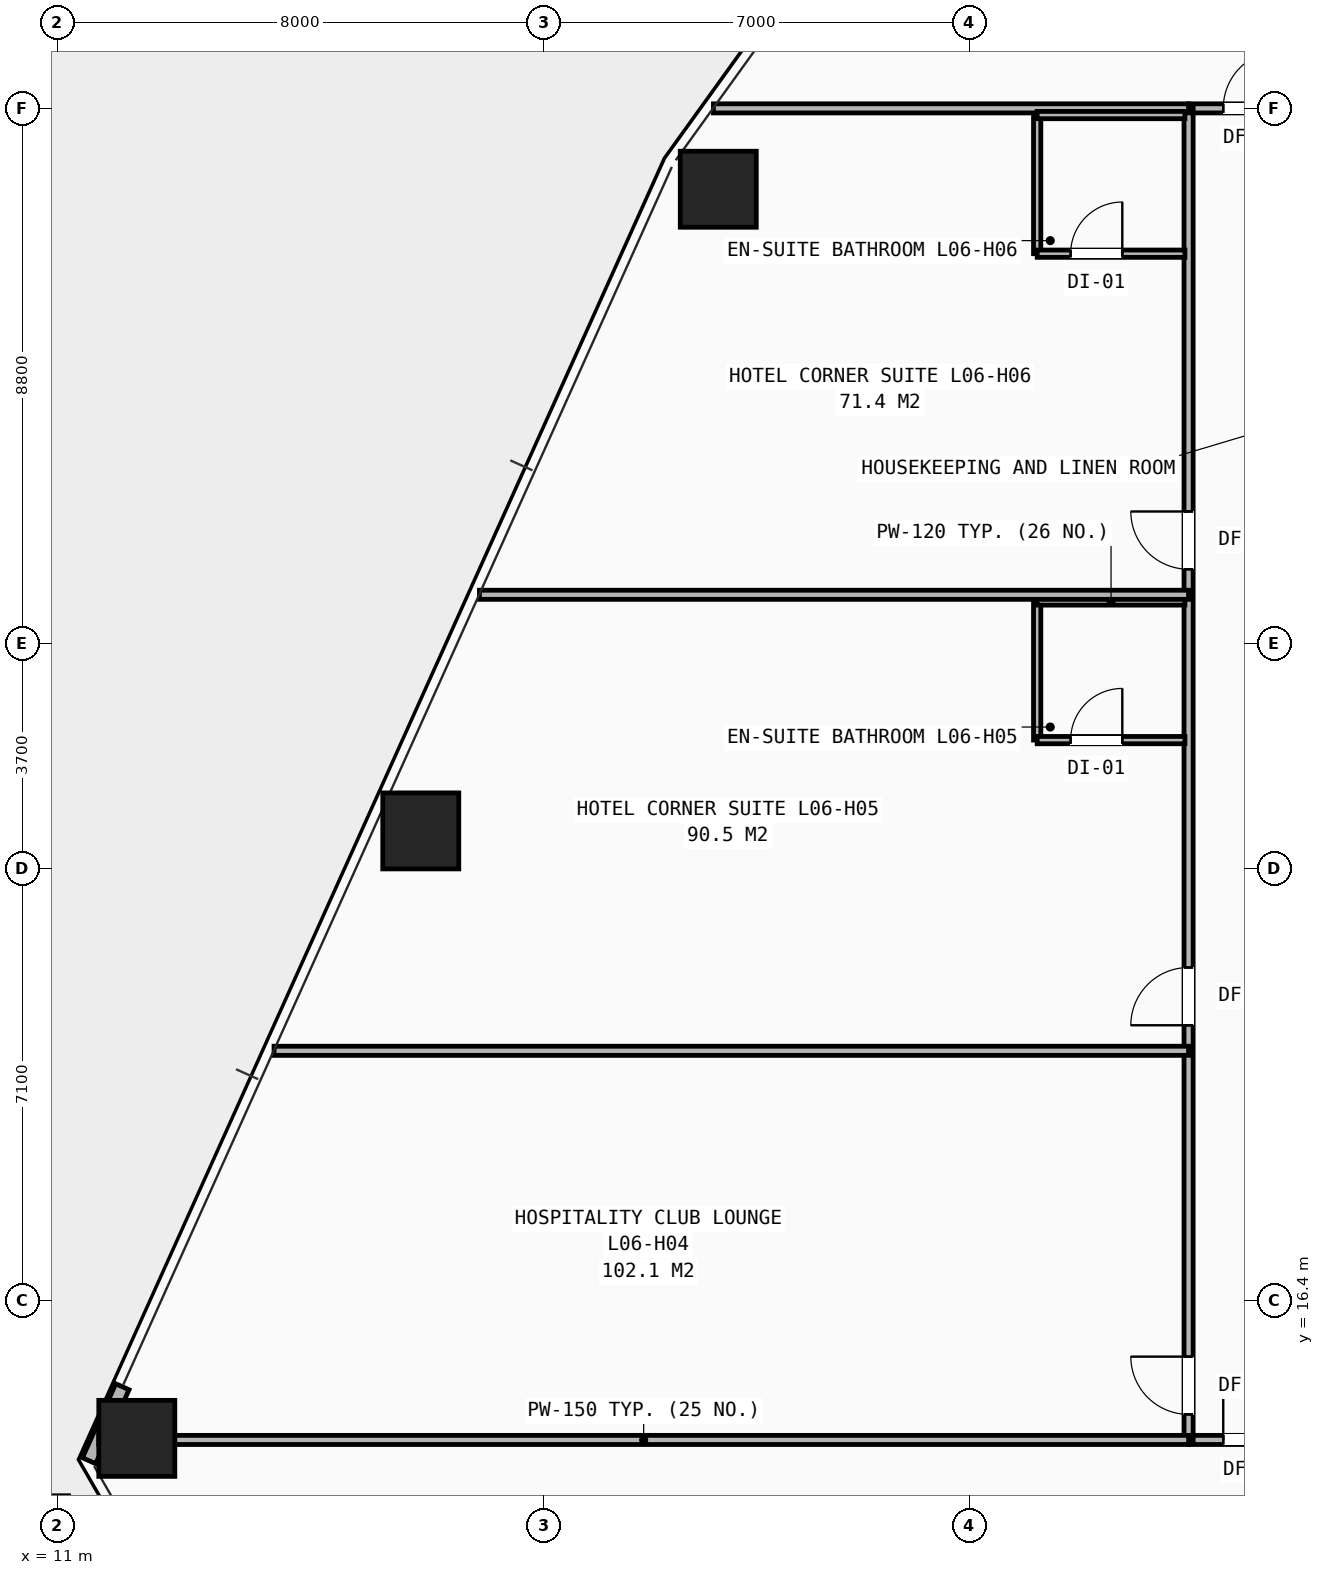
"""IFC4 building model, lengths in metres.
Left out: names, types, materials, properties, quantities, classifications, styles, units other than length and angle.
Written with IfcOpenShell. Run it as: python <this file> out.ifc"""

import sys

from ifc_helpers import new_model, si_unit, direction, frame, frame_2d, origin, origin_2d, place, context, subcontext, project, spatial, rectangle, hollow_rectangle, extrude, element, fill, save


model = new_model("IFC4")
c1 = context("Model", 3, precision=1e-05, world=origin(), true_north=direction((0.0, 1.0)))
c2 = subcontext(c1, "Body", "Model", "MODEL_VIEW")
j1 = project(units=[si_unit("LENGTHUNIT", "METRE"), si_unit("PLANEANGLEUNIT", "RADIAN")], contexts=[c1])
p1 = place(None, origin())
s1 = spatial("IfcSite", under=j1, at=p1, CompositionType="ELEMENT")
p2 = place(p1, origin())
s2 = spatial("IfcBuilding", under=s1, at=p2, CompositionType="ELEMENT")
p3 = place(p2, frame((0.0, 0.0, 27.2)))
s3 = spatial("IfcBuildingStorey", under=s2, at=p3, CompositionType="ELEMENT", Elevation=27.2)
for number, where, z_axis, x_axis in (
    (1, (21.865, 34.67, 0.0), (0.0, 0.0, 1.0), (1.0, 0.0, 0.0)),
    (2, (16.973, 24.116, 0.0), (0.0, 0.0, 1.0), (1.0, 0.0, 0.0)),
    (3, (12.303, 14.126, 0.0), (0.0, 0.0, 1.0), (1.0, 0.0, 0.0)),
):
    element("IfcColumn", number, at=place(p3, frame(where, z_axis=z_axis, x_axis=x_axis)), inside=s3, PredefinedType="COLUMN", context=c2, shape_type="SweptSolid", body=[
        extrude(hollow_rectangle(XDim=1.25, YDim=1.25, WallThickness=0.08, at=origin_2d()), origin(), (0.0, 0.0, 1.0), 3.2),
    ])
p4 = place(p3, frame((12.065, 14.975, 0.0), z_axis=(0.0, 0.0, 1.0), x_axis=(-0.410767856127, -0.91173996752, 0.0)))
e4 = element("IfcWall", 4, at=p4, inside=s3, PredefinedType="SHEAR", context=c2, shape_type="SweptSolid", body=[
    extrude(rectangle(XDim=1.334, YDim=0.24, at=frame_2d((0.667, 0.0))), origin(), (0.0, 0.0, 1.0), 2.263),
])
p5 = place(p3, frame((29.6, 14.1, 0.0), z_axis=(0.0, 0.0, 1.0), x_axis=(1.0, 0.0, 0.0)))
e5 = element("IfcWall", 5, at=p5, inside=s3, PredefinedType="PARTITIONING", context=c2, shape_type="SweptSolid", body=[
    extrude(rectangle(XDim=20.8, YDim=0.15, at=frame_2d((10.4, 0.0))), origin(), (0.0, 0.0, 1.0), 2.431),
])
p6 = place(p5, frame((0.57, 0.0, 0.0)))
e6 = element("IfcOpeningElement", 6, at=p6, cuts=e5, PredefinedType="OPENING", context=c2, shape_type="SweptSolid", body=[
    extrude(rectangle(XDim=0.95, YDim=2.1, at=frame_2d((0.475, 1.05))), frame((0.0, 0.085, 0.0), z_axis=(0.0, -1.0, 0.0), x_axis=(1.0, 0.0, 0.0)), (0.0, 0.0, 1.0), 0.17),
])
p7 = place(p5, frame((5.32, 0.0, 0.0)))
e7 = element("IfcOpeningElement", 7, at=p7, cuts=e5, PredefinedType="OPENING", context=c2, shape_type="SweptSolid", body=[
    extrude(rectangle(XDim=0.95, YDim=2.1, at=frame_2d((0.475, 1.05))), frame((0.0, 0.085, 0.0), z_axis=(0.0, -1.0, 0.0), x_axis=(1.0, 0.0, 0.0)), (0.0, 0.0, 1.0), 0.17),
])
p8 = place(p5, frame((13.32, 0.0, 0.0)))
e8 = element("IfcOpeningElement", 8, at=p8, cuts=e5, PredefinedType="OPENING", context=c2, shape_type="SweptSolid", body=[
    extrude(rectangle(XDim=0.95, YDim=2.1, at=frame_2d((0.475, 1.05))), frame((0.0, 0.085, 0.0), z_axis=(0.0, -1.0, 0.0), x_axis=(1.0, 0.0, 0.0)), (0.0, 0.0, 1.0), 0.17),
])
p9 = place(p3, frame((29.6, 36.0, 0.0), z_axis=(0.0, 0.0, 1.0), x_axis=(1.0, 0.0, 0.0)))
e9 = element("IfcWall", 9, at=p9, inside=s3, PredefinedType="PARTITIONING", context=c2, shape_type="SweptSolid", body=[
    extrude(rectangle(XDim=10.375, YDim=0.15, at=frame_2d((5.188, 0.0))), origin(), (0.0, 0.0, 1.0), 2.98),
])
p10 = place(p9, frame((0.57, 0.0, 0.0)))
e10 = element("IfcOpeningElement", 10, at=p10, cuts=e9, PredefinedType="OPENING", context=c2, shape_type="SweptSolid", body=[
    extrude(rectangle(XDim=0.95, YDim=2.1, at=frame_2d((0.475, 1.05))), frame((0.0, 0.085, 0.0), z_axis=(0.0, -1.0, 0.0), x_axis=(1.0, 0.0, 0.0)), (0.0, 0.0, 1.0), 0.17),
])
p11 = place(p9, frame((5.32, 0.0, 0.0)))
e11 = element("IfcOpeningElement", 11, at=p11, cuts=e9, PredefinedType="OPENING", context=c2, shape_type="SweptSolid", body=[
    extrude(rectangle(XDim=0.95, YDim=2.1, at=frame_2d((0.475, 1.05))), frame((0.0, 0.085, 0.0), z_axis=(0.0, -1.0, 0.0), x_axis=(1.0, 0.0, 0.0)), (0.0, 0.0, 1.0), 0.17),
])
p12 = place(p3, frame((29.6, 14.1, 0.0), z_axis=(0.0, 0.0, 1.0), x_axis=(0.0, 1.0, 0.0)))
e12 = element("IfcWall", 12, at=p12, inside=s3, PredefinedType="PARTITIONING", context=c2, shape_type="SweptSolid", body=[
    extrude(rectangle(XDim=21.9, YDim=0.15, at=frame_2d((10.95, 0.0))), origin(), (0.0, 0.0, 1.0), 2.431),
])
p13 = place(p12, frame((0.42, 0.0, 0.0)))
e13 = element("IfcOpeningElement", 13, at=p13, cuts=e12, PredefinedType="OPENING", context=c2, shape_type="SweptSolid", body=[
    extrude(rectangle(XDim=0.95, YDim=2.1, at=frame_2d((0.475, 1.05))), frame((0.0, 0.085, 0.0), z_axis=(0.0, -1.0, 0.0), x_axis=(1.0, 0.0, 0.0)), (0.0, 0.0, 1.0), 0.17),
])
p14 = place(p12, frame((6.82, 0.0, 0.0)))
e14 = element("IfcOpeningElement", 14, at=p14, cuts=e12, PredefinedType="OPENING", context=c2, shape_type="SweptSolid", body=[
    extrude(rectangle(XDim=0.95, YDim=2.1, at=frame_2d((0.475, 1.05))), frame((0.0, 0.085, 0.0), z_axis=(0.0, -1.0, 0.0), x_axis=(1.0, 0.0, 0.0)), (0.0, 0.0, 1.0), 0.17),
])
p15 = place(p12, frame((14.32, 0.0, 0.0)))
e15 = element("IfcOpeningElement", 15, at=p15, cuts=e12, PredefinedType="OPENING", context=c2, shape_type="SweptSolid", body=[
    extrude(rectangle(XDim=0.95, YDim=2.1, at=frame_2d((0.475, 1.05))), frame((0.0, 0.085, 0.0), z_axis=(0.0, -1.0, 0.0), x_axis=(1.0, 0.0, 0.0)), (0.0, 0.0, 1.0), 0.17),
])
p16 = place(p3, frame((11.677, 14.1, 0.0), z_axis=(0.0, 0.0, 1.0), x_axis=(1.0, 0.0, 0.0)))
e16 = element("IfcWall", 16, at=p16, inside=s3, PredefinedType="PARTITIONING", context=c2, shape_type="SweptSolid", body=[
    extrude(rectangle(XDim=17.923, YDim=0.15, at=frame_2d((8.961, 0.0))), origin(), (0.0, 0.0, 1.0), 2.268),
])
p17 = place(p3, frame((21.786, 36.0, 0.0), z_axis=(0.0, 0.0, 1.0), x_axis=(1.0, 0.0, 0.0)))
e17 = element("IfcWall", 17, at=p17, inside=s3, PredefinedType="PARTITIONING", context=c2, shape_type="SweptSolid", body=[
    extrude(rectangle(XDim=7.814, YDim=0.15, at=frame_2d((3.907, 0.0))), origin(), (0.0, 0.0, 1.0), 2.268),
])
p18 = place(p3, frame((14.56, 20.5, 0.0), z_axis=(0.0, 0.0, 1.0), x_axis=(1.0, 0.0, 0.0)))
e18 = element("IfcWall", 18, at=p18, inside=s3, PredefinedType="PARTITIONING", context=c2, shape_type="SweptSolid", body=[
    extrude(rectangle(XDim=15.041, YDim=0.15, at=frame_2d((7.52, 0.0))), origin(), (0.0, 0.0, 1.0), 2.268),
])
p19 = place(p3, frame((27.11, 25.61, 0.0), z_axis=(0.0, 0.0, 1.0), x_axis=(0.0, 1.0, 0.0)))
e19 = element("IfcWall", 19, at=p19, inside=s3, PredefinedType="PARTITIONING", context=c2, shape_type="SweptSolid", body=[
    extrude(rectangle(XDim=2.28, YDim=0.12, at=frame_2d((1.14, 0.0))), origin(), (0.0, 0.0, 1.0), 2.98),
])
p20 = place(p3, frame((27.11, 25.61, 0.0), z_axis=(0.0, 0.0, 1.0), x_axis=(1.0, 0.0, 0.0)))
e20 = element("IfcWall", 20, at=p20, inside=s3, PredefinedType="PARTITIONING", context=c2, shape_type="SweptSolid", body=[
    extrude(rectangle(XDim=2.43, YDim=0.12, at=frame_2d((1.215, 0.0))), origin(), (0.0, 0.0, 1.0), 2.98),
])
p21 = place(p20, frame((0.55, 0.0, 0.0)))
e21 = element("IfcOpeningElement", 21, at=p21, cuts=e20, PredefinedType="OPENING", context=c2, shape_type="SweptSolid", body=[
    extrude(rectangle(XDim=0.85, YDim=2.05, at=frame_2d((0.425, 1.025))), frame((0.0, 0.07, 0.0), z_axis=(0.0, -1.0, 0.0), x_axis=(1.0, 0.0, 0.0)), (0.0, 0.0, 1.0), 0.14),
])
p22 = place(p3, frame((27.11, 27.89, 0.0), z_axis=(0.0, 0.0, 1.0), x_axis=(1.0, 0.0, 0.0)))
e22 = element("IfcWall", 22, at=p22, inside=s3, PredefinedType="PARTITIONING", context=c2, shape_type="SweptSolid", body=[
    extrude(rectangle(XDim=2.43, YDim=0.12, at=frame_2d((1.215, 0.0))), origin(), (0.0, 0.0, 1.0), 2.98),
])
p23 = place(p3, frame((17.938, 28.0, 0.0), z_axis=(0.0, 0.0, 1.0), x_axis=(1.0, 0.0, 0.0)))
e23 = element("IfcWall", 23, at=p23, inside=s3, PredefinedType="PARTITIONING", context=c2, shape_type="SweptSolid", body=[
    extrude(rectangle(XDim=11.662, YDim=0.15, at=frame_2d((5.831, 0.0))), origin(), (0.0, 0.0, 1.0), 2.268),
])
p24 = place(p3, frame((27.11, 33.61, 0.0), z_axis=(0.0, 0.0, 1.0), x_axis=(0.0, 1.0, 0.0)))
e24 = element("IfcWall", 24, at=p24, inside=s3, PredefinedType="PARTITIONING", context=c2, shape_type="SweptSolid", body=[
    extrude(rectangle(XDim=2.28, YDim=0.12, at=frame_2d((1.14, 0.0))), origin(), (0.0, 0.0, 1.0), 2.513),
])
p25 = place(p3, frame((27.11, 33.61, 0.0), z_axis=(0.0, 0.0, 1.0), x_axis=(1.0, 0.0, 0.0)))
e25 = element("IfcWall", 25, at=p25, inside=s3, PredefinedType="PARTITIONING", context=c2, shape_type="SweptSolid", body=[
    extrude(rectangle(XDim=2.43, YDim=0.12, at=frame_2d((1.215, 0.0))), origin(), (0.0, 0.0, 1.0), 2.98),
])
p26 = place(p25, frame((0.55, 0.0, 0.0)))
e26 = element("IfcOpeningElement", 26, at=p26, cuts=e25, PredefinedType="OPENING", context=c2, shape_type="SweptSolid", body=[
    extrude(rectangle(XDim=0.85, YDim=2.05, at=frame_2d((0.425, 1.025))), frame((0.0, 0.07, 0.0), z_axis=(0.0, -1.0, 0.0), x_axis=(1.0, 0.0, 0.0)), (0.0, 0.0, 1.0), 0.14),
])
p27 = place(p3, frame((27.11, 35.89, 0.0), z_axis=(0.0, 0.0, 1.0), x_axis=(1.0, 0.0, 0.0)))
e27 = element("IfcWall", 27, at=p27, inside=s3, PredefinedType="PARTITIONING", context=c2, shape_type="SweptSolid", body=[
    extrude(rectangle(XDim=2.43, YDim=0.12, at=frame_2d((1.215, 0.0))), origin(), (0.0, 0.0, 1.0), 2.513),
])
p28 = place(p3, frame((0.0, 0.0, -0.3)))
p29 = place(p28, frame((10.0, 12.0, 0.0)))
p30 = place(p29, frame((0.0, 0.0, 0.25)))
e28 = element("IfcWindow", 28, at=p30, inside=s3, PartitioningType="SINGLE_PANEL", PredefinedType="SKYLIGHT", context=c2, shape_type="SweptSolid", body=[
    extrude(rectangle(XDim=2.4, YDim=2.4, at=origin_2d()), origin(), (0.0, 0.0, 1.0), 0.05),
])
p31 = place(p6, origin())
e29 = element("IfcDoor", 29, at=p31, inside=s3, OperationType="SINGLE_SWING_LEFT", PredefinedType="DOOR", context=c2, shape_type="SweptSolid", body=[
    extrude(rectangle(XDim=0.95, YDim=2.1, at=frame_2d((0.475, 1.05))), frame((0.0, 0.025, 0.0), z_axis=(0.0, -1.0, 0.0), x_axis=(1.0, 0.0, 0.0)), (0.0, 0.0, 1.0), 0.05),
])
fill(e6, e29)
p32 = place(p13, origin())
e30 = element("IfcDoor", 30, at=p32, inside=s3, OperationType="SINGLE_SWING_RIGHT", PredefinedType="DOOR", context=c2, shape_type="SweptSolid", body=[
    extrude(rectangle(XDim=0.95, YDim=2.1, at=frame_2d((0.475, 1.05))), frame((0.0, 0.025, 0.0), z_axis=(0.0, -1.0, 0.0), x_axis=(1.0, 0.0, 0.0)), (0.0, 0.0, 1.0), 0.05),
])
fill(e13, e30)
p33 = place(p14, origin())
e31 = element("IfcDoor", 31, at=p33, inside=s3, OperationType="SINGLE_SWING_LEFT", PredefinedType="DOOR", context=c2, shape_type="SweptSolid", body=[
    extrude(rectangle(XDim=0.95, YDim=2.1, at=frame_2d((0.475, 1.05))), frame((0.0, 0.025, 0.0), z_axis=(0.0, -1.0, 0.0), x_axis=(1.0, 0.0, 0.0)), (0.0, 0.0, 1.0), 0.05),
])
fill(e14, e31)
p34 = place(p21, origin())
e32 = element("IfcDoor", 32, at=p34, inside=s3, OperationType="SINGLE_SWING_RIGHT", PredefinedType="DOOR", context=c2, shape_type="SweptSolid", body=[
    extrude(rectangle(XDim=0.85, YDim=2.05, at=frame_2d((0.425, 1.025))), frame((0.0, 0.025, 0.0), z_axis=(0.0, -1.0, 0.0), x_axis=(1.0, 0.0, 0.0)), (0.0, 0.0, 1.0), 0.05),
])
fill(e21, e32)
p35 = place(p15, origin())
e33 = element("IfcDoor", 33, at=p35, inside=s3, OperationType="SINGLE_SWING_RIGHT", PredefinedType="DOOR", context=c2, shape_type="SweptSolid", body=[
    extrude(rectangle(XDim=0.95, YDim=2.1, at=frame_2d((0.475, 1.05))), frame((0.0, 0.025, 0.0), z_axis=(0.0, -1.0, 0.0), x_axis=(1.0, 0.0, 0.0)), (0.0, 0.0, 1.0), 0.05),
])
fill(e15, e33)
p36 = place(p26, origin())
e34 = element("IfcDoor", 34, at=p36, inside=s3, OperationType="SINGLE_SWING_RIGHT", PredefinedType="DOOR", context=c2, shape_type="SweptSolid", body=[
    extrude(rectangle(XDim=0.85, YDim=2.05, at=frame_2d((0.425, 1.025))), frame((0.0, 0.025, 0.0), z_axis=(0.0, -1.0, 0.0), x_axis=(1.0, 0.0, 0.0)), (0.0, 0.0, 1.0), 0.05),
])
fill(e26, e34)
p37 = place(p10, origin())
e35 = element("IfcDoor", 35, at=p37, inside=s3, OperationType="SINGLE_SWING_RIGHT", PredefinedType="DOOR", context=c2, shape_type="SweptSolid", body=[
    extrude(rectangle(XDim=0.95, YDim=2.1, at=frame_2d((0.475, 1.05))), frame((0.0, 0.025, 0.0), z_axis=(0.0, -1.0, 0.0), x_axis=(1.0, 0.0, 0.0)), (0.0, 0.0, 1.0), 0.05),
])
fill(e10, e35)
save(model, sys.argv[1])
